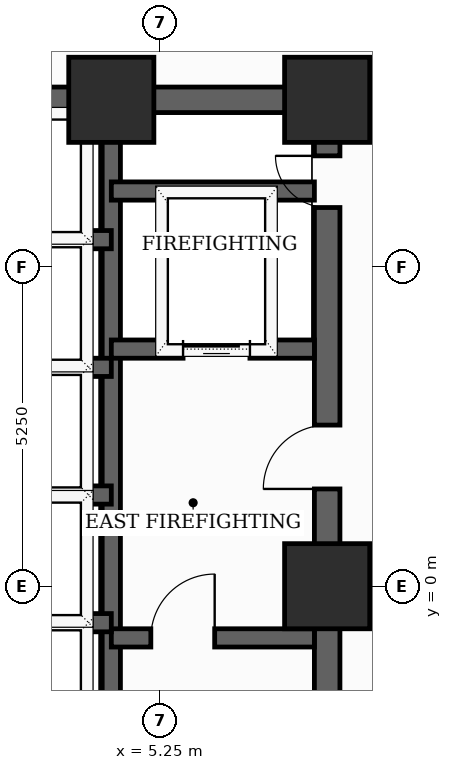
"""IFC4 building model, lengths in metres.
Left out: names, types, materials, properties, quantities, classifications, styles, units other than length and angle.
Written with IfcOpenShell. Run it as: python <this file> out.ifc"""

import sys

from ifc_helpers import new_model, si_unit, direction, frame, frame_2d, origin, origin_2d, place, context, subcontext, project, spatial, rectangle, extrude, element, fill, save


model = new_model("IFC4")
c1 = context("Model", 3, precision=1e-05, world=origin(), true_north=direction((0.0, 1.0)))
c2 = subcontext(c1, "Body", "Model", "MODEL_VIEW")
j1 = project(units=[si_unit("LENGTHUNIT", "METRE"), si_unit("PLANEANGLEUNIT", "RADIAN")], contexts=[c1])
p1 = place(None, origin())
s1 = spatial("IfcSite", under=j1, at=p1, CompositionType="ELEMENT")
p2 = place(p1, origin())
s2 = spatial("IfcBuilding", under=s1, at=p2, CompositionType="ELEMENT")
p3 = place(p2, frame((0.0, 0.0, 116.2)))
s3 = spatial("IfcBuildingStorey", under=s2, at=p3, CompositionType="ELEMENT", Elevation=116.2)
for number, where, z_axis, x_axis in (
    (1, (8.0, 0.0, 0.0), (0.0, 0.0, 1.0), (1.0, 0.0, 0.0)),
    (2, (8.0, 8.0, 0.0), (0.0, 0.0, 1.0), (1.0, 0.0, 0.0)),
    (3, (4.45, 8.0, 0.0), (0.0, 0.0, 1.0), (1.0, 0.0, 0.0)),
):
    element("IfcColumn", number, at=place(p3, frame(where, z_axis=z_axis, x_axis=x_axis)), inside=s3, PredefinedType="COLUMN", context=c2, shape_type="SweptSolid", body=[
        extrude(rectangle(XDim=1.4, YDim=1.4, at=origin_2d()), origin(), (0.0, 0.0, 1.0), 3.7),
    ])
p4 = place(p3, frame((8.0, -8.0, 0.0), z_axis=(0.0, 0.0, 1.0), x_axis=(0.0, 1.0, 0.0)))
e4 = element("IfcWall", 4, at=p4, inside=s3, PredefinedType="SHEAR", context=c2, shape_type="SweptSolid", body=[
    extrude(rectangle(XDim=16.0, YDim=0.42, at=frame_2d((8.0, 0.0))), origin(), (0.0, 0.0, 1.0), 3.5),
])
p5 = place(p4, frame((9.6, 0.0, 0.0)))
e5 = element("IfcOpeningElement", 5, at=p5, cuts=e4, PredefinedType="OPENING", context=c2, shape_type="SweptSolid", body=[
    extrude(rectangle(XDim=1.05, YDim=2.15, at=frame_2d((0.525, 1.075))), frame((0.0, 0.22, 0.0), z_axis=(0.0, -1.0, 0.0), x_axis=(1.0, 0.0, 0.0)), (0.0, 0.0, 1.0), 0.44),
])
p6 = place(p4, frame((14.229, 0.0, 0.0)))
e6 = element("IfcOpeningElement", 6, at=p6, cuts=e4, PredefinedType="OPENING", context=c2, shape_type="SweptSolid", body=[
    extrude(rectangle(XDim=0.85, YDim=2.02, at=frame_2d((0.425, 1.01))), frame((0.0, 0.22, 0.0), z_axis=(0.0, -1.0, 0.0), x_axis=(1.0, 0.0, 0.0)), (0.0, 0.0, 1.0), 0.44),
])
p7 = place(p3, frame((-8.0, 8.0, 0.0), z_axis=(0.0, 0.0, 1.0), x_axis=(1.0, 0.0, 0.0)))
e7 = element("IfcWall", 7, at=p7, inside=s3, PredefinedType="SHEAR", context=c2, shape_type="SweptSolid", body=[
    extrude(rectangle(XDim=16.0, YDim=0.42, at=frame_2d((8.0, 0.0))), origin(), (0.0, 0.0, 1.0), 3.5),
])
p8 = place(p7, frame((7.1, 0.0, 0.0)))
e8 = element("IfcOpeningElement", 8, at=p8, cuts=e7, PredefinedType="OPENING", context=c2, shape_type="SweptSolid", body=[
    extrude(rectangle(XDim=1.8, YDim=2.15, at=frame_2d((0.9, 1.075))), frame((0.0, 0.22, 0.0), z_axis=(0.0, -1.0, 0.0), x_axis=(1.0, 0.0, 0.0)), (0.0, 0.0, 1.0), 0.44),
])
p9 = place(p3, frame((4.45, -7.79, 0.0), z_axis=(0.0, 0.0, 1.0), x_axis=(0.0, 1.0, 0.0)))
e9 = element("IfcWall", 9, at=p9, inside=s3, PredefinedType="SHEAR", context=c2, shape_type="SweptSolid", body=[
    extrude(rectangle(XDim=15.58, YDim=0.3, at=frame_2d((7.79, 0.0))), origin(), (0.0, 0.0, 1.0), 3.5),
])
p10 = place(p3, frame((4.45, -0.85, 0.0), z_axis=(0.0, 0.0, 1.0), x_axis=(1.0, 0.0, 0.0)))
e10 = element("IfcWall", 10, at=p10, inside=s3, PredefinedType="SHEAR", context=c2, shape_type="SweptSolid", body=[
    extrude(rectangle(XDim=3.34, YDim=0.3, at=frame_2d((1.67, 0.0))), origin(), (0.0, 0.0, 1.0), 3.5),
])
p11 = place(p10, frame((0.65, 0.0, 0.0)))
e11 = element("IfcOpeningElement", 11, at=p11, cuts=e10, PredefinedType="OPENING", context=c2, shape_type="SweptSolid", body=[
    extrude(rectangle(XDim=1.05, YDim=2.15, at=frame_2d((0.525, 1.075))), frame((0.0, 0.16, 0.0), z_axis=(0.0, -1.0, 0.0), x_axis=(1.0, 0.0, 0.0)), (0.0, 0.0, 1.0), 0.32),
])
p12 = place(p3, frame((4.45, 3.9, 0.0), z_axis=(0.0, 0.0, 1.0), x_axis=(1.0, 0.0, 0.0)))
e12 = element("IfcWall", 12, at=p12, inside=s3, PredefinedType="SHEAR", context=c2, shape_type="SweptSolid", body=[
    extrude(rectangle(XDim=3.34, YDim=0.3, at=frame_2d((1.67, 0.0))), origin(), (0.0, 0.0, 1.0), 3.5),
])
p13 = place(p12, frame((1.18, 0.0, 0.0)))
e13 = element("IfcOpeningElement", 13, at=p13, cuts=e12, PredefinedType="OPENING", context=c2, shape_type="SweptSolid", body=[
    extrude(rectangle(XDim=1.1, YDim=2.1, at=frame_2d((0.55, 1.05))), frame((0.0, 0.16, 0.0), z_axis=(0.0, -1.0, 0.0), x_axis=(1.0, 0.0, 0.0)), (0.0, 0.0, 1.0), 0.32),
])
p14 = place(p3, frame((4.45, 6.5, 0.0), z_axis=(0.0, 0.0, 1.0), x_axis=(1.0, 0.0, 0.0)))
e14 = element("IfcWall", 14, at=p14, inside=s3, PredefinedType="SHEAR", context=c2, shape_type="SweptSolid", body=[
    extrude(rectangle(XDim=3.34, YDim=0.3, at=frame_2d((1.67, 0.0))), origin(), (0.0, 0.0, 1.0), 3.5),
])
for number, where, z_axis, x_axis in (
    (15, (1.68, 1.5, 0.0), (0.0, 0.0, 1.0), (1.0, 0.0, 0.0)),
    (16, (1.68, 3.6, 0.0), (0.0, 0.0, 1.0), (1.0, 0.0, 0.0)),
    (17, (1.68, 5.7, 0.0), (0.0, 0.0, 1.0), (1.0, 0.0, 0.0)),
    (18, (1.68, -0.6, 0.0), (0.0, 0.0, 1.0), (1.0, 0.0, 0.0)),
):
    element("IfcWall", number, at=place(p3, frame(where, z_axis=z_axis, x_axis=x_axis)), inside=s3, PredefinedType="SHEAR", context=c2, shape_type="SweptSolid", body=[
        extrude(rectangle(XDim=2.77, YDim=0.3, at=frame_2d((1.385, 0.0))), origin(), (0.0, 0.0, 1.0), 3.5),
    ])
p15 = place(p5, origin())
e19 = element("IfcDoor", 19, at=p15, inside=s3, OperationType="SINGLE_SWING_LEFT", PredefinedType="DOOR", context=c2, shape_type="SweptSolid", body=[
    extrude(rectangle(XDim=1.05, YDim=2.15, at=frame_2d((0.525, 1.075))), frame((0.0, 0.025, 0.0), z_axis=(0.0, -1.0, 0.0), x_axis=(1.0, 0.0, 0.0)), (0.0, 0.0, 1.0), 0.05),
])
fill(e5, e19)
p16 = place(p6, origin())
e20 = element("IfcDoor", 20, at=p16, inside=s3, OperationType="SINGLE_SWING_RIGHT", PredefinedType="TRAPDOOR", context=c2, shape_type="SweptSolid", body=[
    extrude(rectangle(XDim=0.85, YDim=2.02, at=frame_2d((0.425, 1.01))), frame((0.0, 0.025, 0.0), z_axis=(0.0, -1.0, 0.0), x_axis=(1.0, 0.0, 0.0)), (0.0, 0.0, 1.0), 0.05),
])
fill(e6, e20)
p17 = place(p11, origin())
e21 = element("IfcDoor", 21, at=p17, inside=s3, OperationType="SINGLE_SWING_RIGHT", PredefinedType="DOOR", context=c2, shape_type="SweptSolid", body=[
    extrude(rectangle(XDim=1.05, YDim=2.15, at=frame_2d((0.525, 1.075))), frame((0.0, 0.025, 0.0), z_axis=(0.0, -1.0, 0.0), x_axis=(1.0, 0.0, 0.0)), (0.0, 0.0, 1.0), 0.05),
])
fill(e11, e21)
p18 = place(p13, origin())
e22 = element("IfcDoor", 22, at=p18, inside=s3, OperationType="SLIDING_TO_LEFT", PredefinedType="DOOR", context=c2, shape_type="SweptSolid", body=[
    extrude(rectangle(XDim=1.1, YDim=2.1, at=frame_2d((0.55, 1.05))), frame((0.0, 0.025, 0.0), z_axis=(0.0, -1.0, 0.0), x_axis=(1.0, 0.0, 0.0)), (0.0, 0.0, 1.0), 0.05),
])
fill(e13, e22)
save(model, sys.argv[1])
